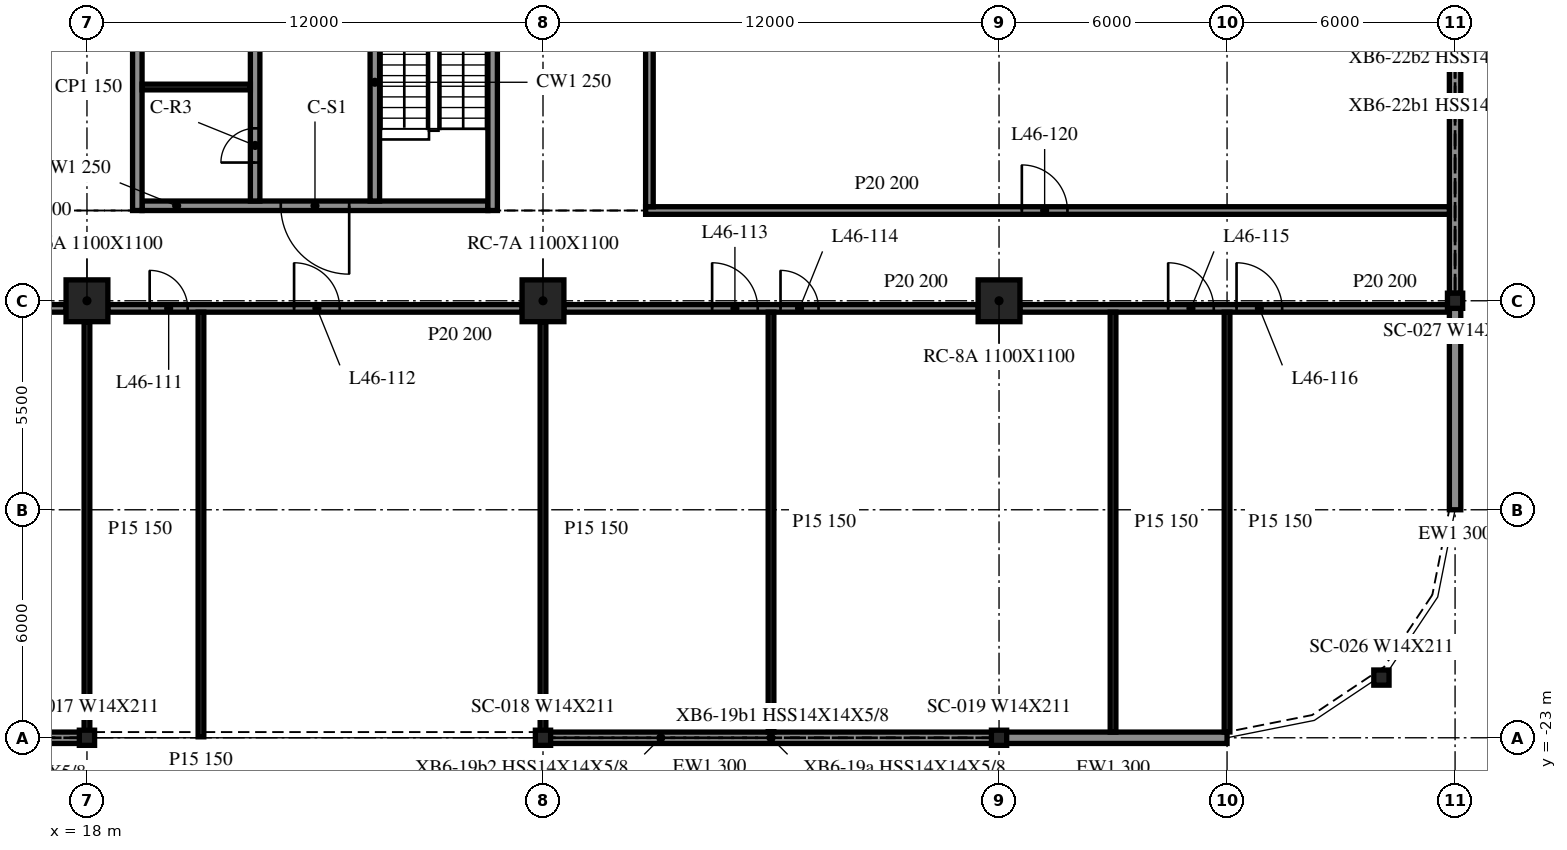
"""IFC4 building model, lengths in metres.
Left out: names, types, materials, properties, quantities, classifications, styles, units other than length and angle.
Written with IfcOpenShell. Run it as: python <this file> out.ifc"""

import sys

from ifc_helpers import new_model, si_unit, direction, frame, frame_2d, origin, origin_2d, place, context, subcontext, project, spatial, rectangle, i_section, extrude, element, fill, save


model = new_model("IFC4")
c1 = context("Model", 3, precision=1e-05, world=origin(), true_north=direction((0.0, 1.0)))
c2 = subcontext(c1, "Body", "Model", "MODEL_VIEW")
j1 = project(units=[si_unit("LENGTHUNIT", "METRE"), si_unit("PLANEANGLEUNIT", "RADIAN")], contexts=[c1])
p1 = place(None, origin())
s1 = spatial("IfcSite", under=j1, at=p1, CompositionType="ELEMENT")
p2 = place(p1, origin())
s2 = spatial("IfcBuilding", under=s1, at=p2, CompositionType="ELEMENT")
p3 = place(p2, frame((0.0, 0.0, 193.9)))
s3 = spatial("IfcBuildingStorey", under=s2, at=p3, CompositionType="ELEMENT", Elevation=193.9)
for number, where, z_axis, x_axis in (
    (1, (18.0, -11.5, -0.34), (0.0, 0.0, 1.0), (1.0, 0.0, 0.0)),
    (2, (30.0, -11.5, -0.34), (0.0, 0.0, 1.0), (1.0, 0.0, 0.0)),
    (3, (42.0, -11.5, -0.34), (0.0, 0.0, 1.0), (1.0, 0.0, 0.0)),
):
    element("IfcColumn", number, at=place(p3, frame(where, z_axis=z_axis, x_axis=x_axis)), inside=s3, PredefinedType="COLUMN", context=c2, shape_type="SweptSolid", body=[
        extrude(rectangle(XDim=1.1, YDim=1.1, at=origin_2d()), origin(), (0.0, 0.0, 1.0), 3.8),
    ])
for number, where, z_axis, x_axis in (
    (4, (18.0, -23.0, -0.34), (0.0, 0.0, 1.0), (1.0, 0.0, 0.0)),
    (5, (30.0, -23.0, -0.34), (0.0, 0.0, 1.0), (1.0, 0.0, 0.0)),
    (6, (42.0, -23.0, -0.34), (0.0, 0.0, 1.0), (1.0, 0.0, 0.0)),
    (7, (52.062, -21.416, -0.34), (0.0, 0.0, 1.0), (1.0, 0.0, 0.0)),
    (8, (54.0, -11.5, -0.34), (0.0, 0.0, 1.0), (1.0, 0.0, 0.0)),
):
    element("IfcColumn", number, at=place(p3, frame(where, z_axis=z_axis, x_axis=x_axis)), inside=s3, PredefinedType="COLUMN", context=c2, shape_type="SweptSolid", body=[
        extrude(i_section(OverallWidth=0.401, OverallDepth=0.399, WebThickness=0.025, FlangeThickness=0.04, at=origin_2d()), origin(), (0.0, 0.0, 1.0), 3.8),
    ])
for number, where, z_axis, x_axis in (
    (9, (6.012, -23.0, 0.0), (0.0, 0.0, 1.0), (1.0, 0.0, 0.0)),
    (10, (30.012, -23.0, 0.0), (0.0, 0.0, 1.0), (1.0, 0.0, 0.0)),
):
    element("IfcWall", number, at=place(p3, frame(where, z_axis=z_axis, x_axis=x_axis)), inside=s3, PredefinedType="NOTDEFINED", context=c2, shape_type="SweptSolid", body=[
        extrude(rectangle(XDim=11.975, YDim=0.3, at=frame_2d((5.988, 0.0))), origin(), (0.0, 0.0, 1.0), 2.782),
    ])
p4 = place(p3, frame((42.012, -23.0, 0.0), z_axis=(0.0, 0.0, 1.0), x_axis=(1.0, 0.0, 0.0)))
e11 = element("IfcWall", 11, at=p4, inside=s3, PredefinedType="NOTDEFINED", context=c2, shape_type="SweptSolid", body=[
    extrude(rectangle(XDim=5.988, YDim=0.3, at=frame_2d((2.994, 0.0))), origin(), (0.0, 0.0, 1.0), 2.782),
])
p5 = place(p3, frame((54.0, -17.0, 0.0), z_axis=(0.0, 0.0, 1.0), x_axis=(0.0, 1.0, 0.0)))
e12 = element("IfcWall", 12, at=p5, inside=s3, PredefinedType="NOTDEFINED", context=c2, shape_type="SweptSolid", body=[
    extrude(rectangle(XDim=5.3, YDim=0.3, at=frame_2d((2.65, 0.0))), origin(), (0.0, 0.0, 1.0), 2.782),
])
p6 = place(p3, frame((54.0, -11.3, 0.0), z_axis=(0.0, 0.0, 1.0), x_axis=(0.0, 1.0, 0.0)))
e13 = element("IfcWall", 13, at=p6, inside=s3, PredefinedType="NOTDEFINED", context=c2, shape_type="SweptSolid", body=[
    extrude(rectangle(XDim=11.1, YDim=0.3, at=frame_2d((5.55, 0.0))), origin(), (0.0, 0.0, 1.0), 2.782),
])
p7 = place(p3, frame((19.325, 15.125, 0.0), z_axis=(0.0, 0.0, 1.0), x_axis=(0.0, -1.0, 0.0)))
e14 = element("IfcWall", 14, at=p7, inside=s3, PredefinedType="SOLIDWALL", context=c2, shape_type="SweptSolid", body=[
    extrude(rectangle(XDim=24.25, YDim=0.25, at=frame_2d((12.125, 0.0))), origin(), (0.0, 0.0, 1.0), 3.46),
])
p8 = place(p3, frame((28.675, -9.125, 0.0), z_axis=(0.0, 0.0, 1.0), x_axis=(0.0, 1.0, 0.0)))
e15 = element("IfcWall", 15, at=p8, inside=s3, PredefinedType="SOLIDWALL", context=c2, shape_type="SweptSolid", body=[
    extrude(rectangle(XDim=24.25, YDim=0.25, at=frame_2d((12.125, 0.0))), origin(), (0.0, 0.0, 1.0), 3.46),
])
p9 = place(p8, frame((14.425, 0.0, 0.0)))
e16 = element("IfcOpeningElement", 16, at=p9, cuts=e15, PredefinedType="OPENING", context=c2, shape_type="SweptSolid", body=[
    extrude(rectangle(XDim=0.9, YDim=2.1, at=frame_2d((0.45, 1.05))), frame((0.0, 0.135, 0.0), z_axis=(0.0, -1.0, 0.0), x_axis=(1.0, 0.0, 0.0)), (0.0, 0.0, 1.0), 0.27),
])
p10 = place(p8, frame((19.175, 0.0, 0.0)))
e17 = element("IfcOpeningElement", 17, at=p10, cuts=e15, PredefinedType="OPENING", context=c2, shape_type="SweptSolid", body=[
    extrude(rectangle(XDim=0.9, YDim=2.1, at=frame_2d((0.45, 1.05))), frame((0.0, 0.135, 0.0), z_axis=(0.0, -1.0, 0.0), x_axis=(1.0, 0.0, 0.0)), (0.0, 0.0, 1.0), 0.27),
])
p11 = place(p8, frame((22.587, 0.0, 0.0)))
e18 = element("IfcOpeningElement", 18, at=p11, cuts=e15, PredefinedType="OPENING", context=c2, shape_type="SweptSolid", body=[
    extrude(rectangle(XDim=0.9, YDim=2.1, at=frame_2d((0.45, 1.05))), frame((0.0, 0.135, 0.0), z_axis=(0.0, -1.0, 0.0), x_axis=(1.0, 0.0, 0.0)), (0.0, 0.0, 1.0), 0.27),
])
p12 = place(p3, frame((28.55, -9.0, 0.0), z_axis=(0.0, 0.0, 1.0), x_axis=(-1.0, 0.0, 0.0)))
e19 = element("IfcWall", 19, at=p12, inside=s3, PredefinedType="SOLIDWALL", context=c2, shape_type="SweptSolid", body=[
    extrude(rectangle(XDim=9.1, YDim=0.25, at=frame_2d((4.55, 0.0))), origin(), (0.0, 0.0, 1.0), 3.46),
])
p13 = place(p12, frame((3.65, 0.0, 0.0)))
e20 = element("IfcOpeningElement", 20, at=p13, cuts=e19, PredefinedType="OPENING", context=c2, shape_type="SweptSolid", body=[
    extrude(rectangle(XDim=1.8, YDim=2.1, at=frame_2d((0.9, 1.05))), frame((0.0, 0.135, 0.0), z_axis=(0.0, -1.0, 0.0), x_axis=(1.0, 0.0, 0.0)), (0.0, 0.0, 1.0), 0.27),
])
p14 = place(p3, frame((22.425, -8.875, 0.0), z_axis=(0.0, 0.0, 1.0), x_axis=(0.0, 1.0, 0.0)))
e21 = element("IfcWall", 21, at=p14, inside=s3, PredefinedType="SOLIDWALL", context=c2, shape_type="SweptSolid", body=[
    extrude(rectangle(XDim=17.5, YDim=0.25, at=frame_2d((8.75, 0.0))), origin(), (0.0, 0.0, 1.0), 3.46),
])
p15 = place(p14, frame((7.2, 0.0, 0.0)))
e22 = element("IfcOpeningElement", 22, at=p15, cuts=e21, PredefinedType="OPENING", context=c2, shape_type="SweptSolid", body=[
    extrude(rectangle(XDim=1.1, YDim=2.1, at=frame_2d((0.55, 1.05))), frame((0.0, 0.135, 0.0), z_axis=(0.0, -1.0, 0.0), x_axis=(1.0, 0.0, 0.0)), (0.0, 0.0, 1.0), 0.27),
])
p16 = place(p14, frame((9.95, 0.0, 0.0)))
e23 = element("IfcOpeningElement", 23, at=p16, cuts=e21, PredefinedType="OPENING", context=c2, shape_type="SweptSolid", body=[
    extrude(rectangle(XDim=1.1, YDim=2.1, at=frame_2d((0.55, 1.05))), frame((0.0, 0.135, 0.0), z_axis=(0.0, -1.0, 0.0), x_axis=(1.0, 0.0, 0.0)), (0.0, 0.0, 1.0), 0.27),
])
p17 = place(p14, frame((12.7, 0.0, 0.0)))
e24 = element("IfcOpeningElement", 24, at=p17, cuts=e21, PredefinedType="OPENING", context=c2, shape_type="SweptSolid", body=[
    extrude(rectangle(XDim=1.1, YDim=2.1, at=frame_2d((0.55, 1.05))), frame((0.0, 0.135, 0.0), z_axis=(0.0, -1.0, 0.0), x_axis=(1.0, 0.0, 0.0)), (0.0, 0.0, 1.0), 0.27),
])
p18 = place(p14, frame((15.45, 0.0, 0.0)))
e25 = element("IfcOpeningElement", 25, at=p18, cuts=e21, PredefinedType="OPENING", context=c2, shape_type="SweptSolid", body=[
    extrude(rectangle(XDim=1.1, YDim=2.1, at=frame_2d((0.55, 1.05))), frame((0.0, 0.135, 0.0), z_axis=(0.0, -1.0, 0.0), x_axis=(1.0, 0.0, 0.0)), (0.0, 0.0, 1.0), 0.27),
])
p19 = place(p14, frame((1.012, 0.0, 0.0)))
e26 = element("IfcOpeningElement", 26, at=p19, cuts=e21, PredefinedType="OPENING", context=c2, shape_type="SweptSolid", body=[
    extrude(rectangle(XDim=0.9, YDim=2.1, at=frame_2d((0.45, 1.05))), frame((0.0, 0.135, 0.0), z_axis=(0.0, -1.0, 0.0), x_axis=(1.0, 0.0, 0.0)), (0.0, 0.0, 1.0), 0.27),
])
p20 = place(p14, frame((4.087, 0.0, 0.0)))
e27 = element("IfcOpeningElement", 27, at=p20, cuts=e21, PredefinedType="OPENING", context=c2, shape_type="SweptSolid", body=[
    extrude(rectangle(XDim=0.9, YDim=2.1, at=frame_2d((0.45, 1.05))), frame((0.0, 0.135, 0.0), z_axis=(0.0, -1.0, 0.0), x_axis=(1.0, 0.0, 0.0)), (0.0, 0.0, 1.0), 0.27),
])
p21 = place(p3, frame((25.575, -8.875, 0.0), z_axis=(0.0, 0.0, 1.0), x_axis=(0.0, 1.0, 0.0)))
e28 = element("IfcWall", 28, at=p21, inside=s3, PredefinedType="SOLIDWALL", context=c2, shape_type="SweptSolid", body=[
    extrude(rectangle(XDim=6.25, YDim=0.25, at=frame_2d((3.125, 0.0))), origin(), (0.0, 0.0, 1.0), 3.46),
])
p22 = place(p21, frame((4.85, 0.0, 0.0)))
e29 = element("IfcOpeningElement", 29, at=p22, cuts=e28, PredefinedType="OPENING", context=c2, shape_type="SweptSolid", body=[
    extrude(rectangle(XDim=1.0, YDim=2.1, at=frame_2d((0.5, 1.05))), frame((0.0, 0.135, 0.0), z_axis=(0.0, -1.0, 0.0), x_axis=(1.0, 0.0, 0.0)), (0.0, 0.0, 1.0), 0.27),
])
p23 = place(p3, frame((19.45, -5.875, 0.0), z_axis=(0.0, 0.0, 1.0), x_axis=(1.0, 0.0, 0.0)))
e30 = element("IfcWall", 30, at=p23, inside=s3, PredefinedType="PARTITIONING", context=c2, shape_type="SweptSolid", body=[
    extrude(rectangle(XDim=2.85, YDim=0.15, at=frame_2d((1.425, 0.0))), origin(), (0.0, 0.0, 1.0), 3.46),
])
p24 = place(p3, frame((6.55, -11.7, 0.0), z_axis=(0.0, 0.0, 1.0), x_axis=(1.0, 0.0, 0.0)))
e31 = element("IfcWall", 31, at=p24, inside=s3, PredefinedType="PARTITIONING", context=c2, shape_type="SweptSolid", body=[
    extrude(rectangle(XDim=10.9, YDim=0.2, at=frame_2d((5.45, 0.0))), origin(), (0.0, 0.0, 1.0), 3.46),
])
p25 = place(p24, frame((3.9, 0.0, 0.0)))
e32 = element("IfcOpeningElement", 32, at=p25, cuts=e31, PredefinedType="OPENING", context=c2, shape_type="SweptSolid", body=[
    extrude(rectangle(XDim=1.2, YDim=2.1, at=frame_2d((0.6, 1.05))), frame((0.0, 0.11, 0.0), z_axis=(0.0, -1.0, 0.0), x_axis=(1.0, 0.0, 0.0)), (0.0, 0.0, 1.0), 0.22),
])
p26 = place(p24, frame((5.7, 0.0, 0.0)))
e33 = element("IfcOpeningElement", 33, at=p26, cuts=e31, PredefinedType="OPENING", context=c2, shape_type="SweptSolid", body=[
    extrude(rectangle(XDim=1.2, YDim=2.1, at=frame_2d((0.6, 1.05))), frame((0.0, 0.11, 0.0), z_axis=(0.0, -1.0, 0.0), x_axis=(1.0, 0.0, 0.0)), (0.0, 0.0, 1.0), 0.22),
])
p27 = place(p3, frame((18.55, -11.7, 0.0), z_axis=(0.0, 0.0, 1.0), x_axis=(1.0, 0.0, 0.0)))
e34 = element("IfcWall", 34, at=p27, inside=s3, PredefinedType="PARTITIONING", context=c2, shape_type="SweptSolid", body=[
    extrude(rectangle(XDim=10.9, YDim=0.2, at=frame_2d((5.45, 0.0))), origin(), (0.0, 0.0, 1.0), 3.46),
])
p28 = place(p27, frame((1.1, 0.0, 0.0)))
e35 = element("IfcOpeningElement", 35, at=p28, cuts=e34, PredefinedType="OPENING", context=c2, shape_type="SweptSolid", body=[
    extrude(rectangle(XDim=1.0, YDim=2.1, at=frame_2d((0.5, 1.05))), frame((0.0, 0.11, 0.0), z_axis=(0.0, -1.0, 0.0), x_axis=(1.0, 0.0, 0.0)), (0.0, 0.0, 1.0), 0.22),
])
p29 = place(p27, frame((4.9, 0.0, 0.0)))
e36 = element("IfcOpeningElement", 36, at=p29, cuts=e34, PredefinedType="OPENING", context=c2, shape_type="SweptSolid", body=[
    extrude(rectangle(XDim=1.2, YDim=2.1, at=frame_2d((0.6, 1.05))), frame((0.0, 0.11, 0.0), z_axis=(0.0, -1.0, 0.0), x_axis=(1.0, 0.0, 0.0)), (0.0, 0.0, 1.0), 0.22),
])
p30 = place(p3, frame((30.55, -11.7, 0.0), z_axis=(0.0, 0.0, 1.0), x_axis=(1.0, 0.0, 0.0)))
e37 = element("IfcWall", 37, at=p30, inside=s3, PredefinedType="PARTITIONING", context=c2, shape_type="SweptSolid", body=[
    extrude(rectangle(XDim=10.9, YDim=0.2, at=frame_2d((5.45, 0.0))), origin(), (0.0, 0.0, 1.0), 3.46),
])
p31 = place(p30, frame((3.9, 0.0, 0.0)))
e38 = element("IfcOpeningElement", 38, at=p31, cuts=e37, PredefinedType="OPENING", context=c2, shape_type="SweptSolid", body=[
    extrude(rectangle(XDim=1.2, YDim=2.1, at=frame_2d((0.6, 1.05))), frame((0.0, 0.11, 0.0), z_axis=(0.0, -1.0, 0.0), x_axis=(1.0, 0.0, 0.0)), (0.0, 0.0, 1.0), 0.22),
])
p32 = place(p30, frame((5.7, 0.0, 0.0)))
e39 = element("IfcOpeningElement", 39, at=p32, cuts=e37, PredefinedType="OPENING", context=c2, shape_type="SweptSolid", body=[
    extrude(rectangle(XDim=1.0, YDim=2.1, at=frame_2d((0.5, 1.05))), frame((0.0, 0.11, 0.0), z_axis=(0.0, -1.0, 0.0), x_axis=(1.0, 0.0, 0.0)), (0.0, 0.0, 1.0), 0.22),
])
p33 = place(p3, frame((42.55, -11.7, 0.0), z_axis=(0.0, 0.0, 1.0), x_axis=(1.0, 0.0, 0.0)))
e40 = element("IfcWall", 40, at=p33, inside=s3, PredefinedType="PARTITIONING", context=c2, shape_type="SweptSolid", body=[
    extrude(rectangle(XDim=11.3, YDim=0.2, at=frame_2d((5.65, 0.0))), origin(), (0.0, 0.0, 1.0), 3.46),
])
p34 = place(p33, frame((3.9, 0.0, 0.0)))
e41 = element("IfcOpeningElement", 41, at=p34, cuts=e40, PredefinedType="OPENING", context=c2, shape_type="SweptSolid", body=[
    extrude(rectangle(XDim=1.2, YDim=2.1, at=frame_2d((0.6, 1.05))), frame((0.0, 0.11, 0.0), z_axis=(0.0, -1.0, 0.0), x_axis=(1.0, 0.0, 0.0)), (0.0, 0.0, 1.0), 0.22),
])
p35 = place(p33, frame((5.7, 0.0, 0.0)))
e42 = element("IfcOpeningElement", 42, at=p35, cuts=e40, PredefinedType="OPENING", context=c2, shape_type="SweptSolid", body=[
    extrude(rectangle(XDim=1.2, YDim=2.1, at=frame_2d((0.6, 1.05))), frame((0.0, 0.11, 0.0), z_axis=(0.0, -1.0, 0.0), x_axis=(1.0, 0.0, 0.0)), (0.0, 0.0, 1.0), 0.22),
])
p36 = place(p3, frame((32.7, -9.125, 0.0), z_axis=(0.0, 0.0, 1.0), x_axis=(1.0, 0.0, 0.0)))
e43 = element("IfcWall", 43, at=p36, inside=s3, PredefinedType="PARTITIONING", context=c2, shape_type="SweptSolid", body=[
    extrude(rectangle(XDim=21.15, YDim=0.2, at=frame_2d((10.575, 0.0))), origin(), (0.0, 0.0, 1.0), 3.46),
])
p37 = place(p36, frame((9.9, 0.0, 0.0)))
e44 = element("IfcOpeningElement", 44, at=p37, cuts=e43, PredefinedType="OPENING", context=c2, shape_type="SweptSolid", body=[
    extrude(rectangle(XDim=1.2, YDim=2.1, at=frame_2d((0.6, 1.05))), frame((0.0, 0.11, 0.0), z_axis=(0.0, -1.0, 0.0), x_axis=(1.0, 0.0, 0.0)), (0.0, 0.0, 1.0), 0.22),
])
p38 = place(p3, frame((18.0, -22.975, 0.0), z_axis=(0.0, 0.0, 1.0), x_axis=(0.0, 1.0, 0.0)))
e45 = element("IfcWall", 45, at=p38, inside=s3, PredefinedType="PARTITIONING", context=c2, shape_type="SweptSolid", body=[
    extrude(rectangle(XDim=10.925, YDim=0.15, at=frame_2d((5.462, 0.0))), origin(), (0.0, 0.0, 1.0), 3.46),
])
p39 = place(p3, frame((21.0, -22.975, 0.0), z_axis=(0.0, 0.0, 1.0), x_axis=(0.0, 1.0, 0.0)))
e46 = element("IfcWall", 46, at=p39, inside=s3, PredefinedType="PARTITIONING", context=c2, shape_type="SweptSolid", body=[
    extrude(rectangle(XDim=11.175, YDim=0.15, at=frame_2d((5.587, 0.0))), origin(), (0.0, 0.0, 1.0), 3.46),
])
p40 = place(p3, frame((30.0, -22.975, 0.0), z_axis=(0.0, 0.0, 1.0), x_axis=(0.0, 1.0, 0.0)))
e47 = element("IfcWall", 47, at=p40, inside=s3, PredefinedType="PARTITIONING", context=c2, shape_type="SweptSolid", body=[
    extrude(rectangle(XDim=10.925, YDim=0.15, at=frame_2d((5.462, 0.0))), origin(), (0.0, 0.0, 1.0), 3.46),
])
p41 = place(p3, frame((32.8, -9.025, 0.0), z_axis=(0.0, 0.0, 1.0), x_axis=(0.0, 1.0, 0.0)))
e48 = element("IfcWall", 48, at=p41, inside=s3, PredefinedType="PARTITIONING", context=c2, shape_type="SweptSolid", body=[
    extrude(rectangle(XDim=24.05, YDim=0.2, at=frame_2d((12.025, 0.0))), origin(), (0.0, 0.0, 1.0), 3.46),
])
for number, where, z_axis, x_axis in (
    (49, (36.0, -22.85, 0.0), (0.0, 0.0, 1.0), (0.0, 1.0, 0.0)),
    (50, (45.0, -22.85, 0.0), (0.0, 0.0, 1.0), (0.0, 1.0, 0.0)),
):
    element("IfcWall", number, at=place(p3, frame(where, z_axis=z_axis, x_axis=x_axis)), inside=s3, PredefinedType="PARTITIONING", context=c2, shape_type="SweptSolid", body=[
        extrude(rectangle(XDim=11.05, YDim=0.15, at=frame_2d((5.525, 0.0))), origin(), (0.0, 0.0, 1.0), 3.46),
    ])
p42 = place(p3, frame((48.0, -22.847, 0.0), z_axis=(0.0, 0.0, 1.0), x_axis=(0.0, 1.0, 0.0)))
e51 = element("IfcWall", 51, at=p42, inside=s3, PredefinedType="PARTITIONING", context=c2, shape_type="SweptSolid", body=[
    extrude(rectangle(XDim=11.047, YDim=0.15, at=frame_2d((5.523, 0.0))), origin(), (0.0, 0.0, 1.0), 3.46),
])
p43 = place(p13, origin())
e52 = element("IfcDoor", 52, at=p43, inside=s3, OperationType="DOUBLE_DOOR_SINGLE_SWING", PredefinedType="DOOR", context=c2, shape_type="SweptSolid", body=[
    extrude(rectangle(XDim=1.8, YDim=2.1, at=frame_2d((0.9, 1.05))), frame((0.0, 0.025, 0.0), z_axis=(0.0, -1.0, 0.0), x_axis=(1.0, 0.0, 0.0)), (0.0, 0.0, 1.0), 0.05),
])
fill(e20, e52)
p44 = place(p19, origin())
e53 = element("IfcDoor", 53, at=p44, inside=s3, OperationType="SINGLE_SWING_LEFT", PredefinedType="DOOR", context=c2, shape_type="SweptSolid", body=[
    extrude(rectangle(XDim=0.9, YDim=2.1, at=frame_2d((0.45, 1.05))), frame((0.0, 0.025, 0.0), z_axis=(0.0, -1.0, 0.0), x_axis=(1.0, 0.0, 0.0)), (0.0, 0.0, 1.0), 0.05),
])
fill(e26, e53)
p45 = place(p28, origin())
e54 = element("IfcDoor", 54, at=p45, inside=s3, OperationType="SINGLE_SWING_RIGHT", PredefinedType="DOOR", context=c2, shape_type="SweptSolid", body=[
    extrude(rectangle(XDim=1.0, YDim=2.1, at=frame_2d((0.5, 1.05))), frame((0.0, 0.025, 0.0), z_axis=(0.0, -1.0, 0.0), x_axis=(1.0, 0.0, 0.0)), (0.0, 0.0, 1.0), 0.05),
])
fill(e35, e54)
p46 = place(p29, origin())
e55 = element("IfcDoor", 55, at=p46, inside=s3, OperationType="SINGLE_SWING_LEFT", PredefinedType="DOOR", context=c2, shape_type="SweptSolid", body=[
    extrude(rectangle(XDim=1.2, YDim=2.1, at=frame_2d((0.6, 1.05))), frame((0.0, 0.025, 0.0), z_axis=(0.0, -1.0, 0.0), x_axis=(1.0, 0.0, 0.0)), (0.0, 0.0, 1.0), 0.05),
])
fill(e36, e55)
p47 = place(p31, origin())
e56 = element("IfcDoor", 56, at=p47, inside=s3, OperationType="SINGLE_SWING_RIGHT", PredefinedType="DOOR", context=c2, shape_type="SweptSolid", body=[
    extrude(rectangle(XDim=1.2, YDim=2.1, at=frame_2d((0.6, 1.05))), frame((0.0, 0.025, 0.0), z_axis=(0.0, -1.0, 0.0), x_axis=(1.0, 0.0, 0.0)), (0.0, 0.0, 1.0), 0.05),
])
fill(e38, e56)
p48 = place(p32, origin())
e57 = element("IfcDoor", 57, at=p48, inside=s3, OperationType="SINGLE_SWING_LEFT", PredefinedType="DOOR", context=c2, shape_type="SweptSolid", body=[
    extrude(rectangle(XDim=1.0, YDim=2.1, at=frame_2d((0.5, 1.05))), frame((0.0, 0.025, 0.0), z_axis=(0.0, -1.0, 0.0), x_axis=(1.0, 0.0, 0.0)), (0.0, 0.0, 1.0), 0.05),
])
fill(e39, e57)
p49 = place(p34, origin())
e58 = element("IfcDoor", 58, at=p49, inside=s3, OperationType="SINGLE_SWING_RIGHT", PredefinedType="DOOR", context=c2, shape_type="SweptSolid", body=[
    extrude(rectangle(XDim=1.2, YDim=2.1, at=frame_2d((0.6, 1.05))), frame((0.0, 0.025, 0.0), z_axis=(0.0, -1.0, 0.0), x_axis=(1.0, 0.0, 0.0)), (0.0, 0.0, 1.0), 0.05),
])
fill(e41, e58)
p50 = place(p35, origin())
e59 = element("IfcDoor", 59, at=p50, inside=s3, OperationType="SINGLE_SWING_LEFT", PredefinedType="DOOR", context=c2, shape_type="SweptSolid", body=[
    extrude(rectangle(XDim=1.2, YDim=2.1, at=frame_2d((0.6, 1.05))), frame((0.0, 0.025, 0.0), z_axis=(0.0, -1.0, 0.0), x_axis=(1.0, 0.0, 0.0)), (0.0, 0.0, 1.0), 0.05),
])
fill(e42, e59)
p51 = place(p37, origin())
e60 = element("IfcDoor", 60, at=p51, inside=s3, OperationType="SINGLE_SWING_LEFT", PredefinedType="DOOR", context=c2, shape_type="SweptSolid", body=[
    extrude(rectangle(XDim=1.2, YDim=2.1, at=frame_2d((0.6, 1.05))), frame((0.0, 0.025, 0.0), z_axis=(0.0, -1.0, 0.0), x_axis=(1.0, 0.0, 0.0)), (0.0, 0.0, 1.0), 0.05),
])
fill(e44, e60)
save(model, sys.argv[1])
